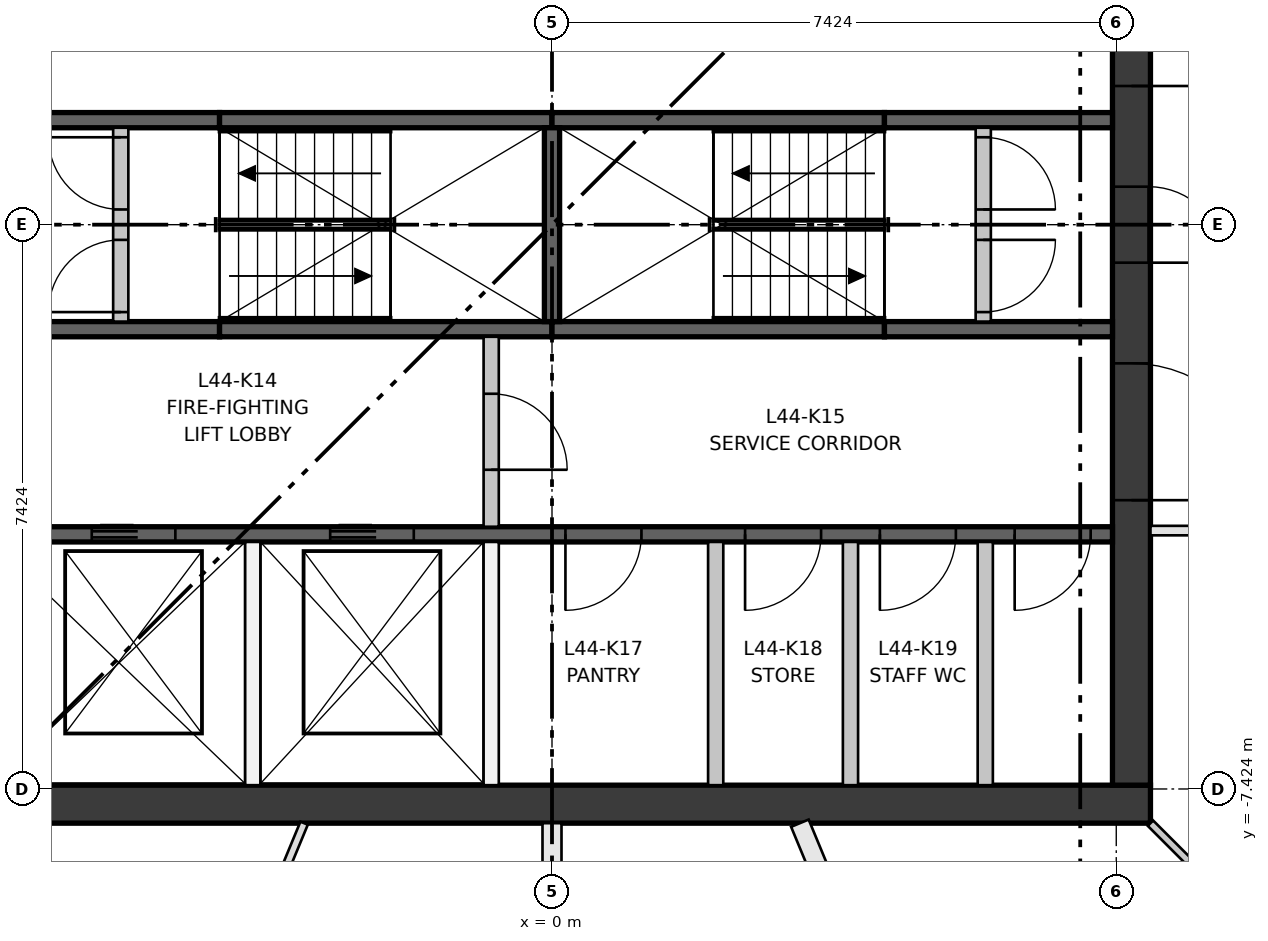
"""IFC4 building model, lengths in metres.
Left out: names, types, materials, properties, quantities, classifications, styles, units other than length and angle.
Written with IfcOpenShell. Run it as: python <this file> out.ifc"""

import sys

from ifc_helpers import new_model, si_unit, direction, frame, frame_2d, origin, place, context, subcontext, project, spatial, rectangle, extrude, element, fill, save


model = new_model("IFC4")
c1 = context("Model", 3, precision=1e-05, world=origin(), true_north=direction((0.0, 1.0)))
c2 = subcontext(c1, "Body", "Model", "MODEL_VIEW")
j1 = project(units=[si_unit("LENGTHUNIT", "METRE"), si_unit("PLANEANGLEUNIT", "RADIAN")], contexts=[c1])
p1 = place(None, origin())
s1 = spatial("IfcSite", under=j1, at=p1, CompositionType="ELEMENT")
p2 = place(p1, origin())
s2 = spatial("IfcBuilding", under=s1, at=p2, CompositionType="ELEMENT")
p3 = place(p2, frame((0.0, 0.0, 167.55)))
s3 = spatial("IfcBuildingStorey", under=s2, at=p3, CompositionType="ELEMENT", Elevation=167.55)
p4 = place(p3, frame((-7.874, -7.624, 0.0), z_axis=(0.0, 0.0, 1.0), x_axis=(1.0, 0.0, 0.0)))
e1 = element("IfcWall", 1, at=p4, inside=s3, PredefinedType="SHEAR", context=c2, shape_type="SweptSolid", body=[
    extrude(rectangle(XDim=15.748, YDim=0.5, at=frame_2d((7.874, 0.0))), origin(), (0.0, 0.0, 1.0), 3.35),
])
p5 = place(p3, frame((7.624, -7.374, 0.0), z_axis=(0.0, 0.0, 1.0), x_axis=(0.0, 1.0, 0.0)))
e2 = element("IfcWall", 2, at=p5, inside=s3, PredefinedType="SHEAR", context=c2, shape_type="SweptSolid", body=[
    extrude(rectangle(XDim=14.748, YDim=0.5, at=frame_2d((7.374, 0.0))), origin(), (0.0, 0.0, 1.0), 3.35),
])
p6 = place(p5, frame((6.874, 0.0, 0.0)))
e3 = element("IfcOpeningElement", 3, at=p6, cuts=e2, PredefinedType="OPENING", context=c2, shape_type="SweptSolid", body=[
    extrude(rectangle(XDim=1.0, YDim=2.1, at=frame_2d((0.5, 1.05))), frame((0.0, 0.26, 0.0), z_axis=(0.0, -1.0, 0.0), x_axis=(1.0, 0.0, 0.0)), (0.0, 0.0, 1.0), 0.52),
])
p7 = place(p5, frame((3.75, 0.0, 0.0)))
e4 = element("IfcOpeningElement", 4, at=p7, cuts=e2, PredefinedType="OPENING", context=c2, shape_type="SweptSolid", body=[
    extrude(rectangle(XDim=1.8, YDim=2.1, at=frame_2d((0.9, 1.05))), frame((0.0, 0.26, 0.0), z_axis=(0.0, -1.0, 0.0), x_axis=(1.0, 0.0, 0.0)), (0.0, 0.0, 1.0), 0.52),
])
p8 = place(p5, frame((9.198, 0.0, 0.0)))
e5 = element("IfcOpeningElement", 5, at=p8, cuts=e2, PredefinedType="OPENING", context=c2, shape_type="SweptSolid", body=[
    extrude(rectangle(XDim=1.8, YDim=2.1, at=frame_2d((0.9, 1.05))), frame((0.0, 0.26, 0.0), z_axis=(0.0, -1.0, 0.0), x_axis=(1.0, 0.0, 0.0)), (0.0, 0.0, 1.0), 0.52),
])
p9 = place(p3, frame((-7.374, -4.074, 0.0), z_axis=(0.0, 0.0, 1.0), x_axis=(1.0, 0.0, 0.0)))
e6 = element("IfcWall", 6, at=p9, inside=s3, PredefinedType="SHEAR", context=c2, shape_type="SweptSolid", body=[
    extrude(rectangle(XDim=14.748, YDim=0.2, at=frame_2d((7.374, 0.0))), origin(), (0.0, 0.0, 1.0), 3.0),
])
p10 = place(p9, frame((1.319, 0.0, 0.0)))
e7 = element("IfcOpeningElement", 7, at=p10, cuts=e6, PredefinedType="OPENING", context=c2, shape_type="SweptSolid", body=[
    extrude(rectangle(XDim=1.1, YDim=2.1, at=frame_2d((0.55, 1.05))), frame((0.0, 0.11, 0.0), z_axis=(0.0, -1.0, 0.0), x_axis=(1.0, 0.0, 0.0)), (0.0, 0.0, 1.0), 0.22),
])
p11 = place(p9, frame((4.456, 0.0, 0.0)))
e8 = element("IfcOpeningElement", 8, at=p11, cuts=e6, PredefinedType="OPENING", context=c2, shape_type="SweptSolid", body=[
    extrude(rectangle(XDim=1.1, YDim=2.1, at=frame_2d((0.55, 1.05))), frame((0.0, 0.11, 0.0), z_axis=(0.0, -1.0, 0.0), x_axis=(1.0, 0.0, 0.0)), (0.0, 0.0, 1.0), 0.22),
])
p12 = place(p9, frame((7.551, 0.0, 0.0)))
e9 = element("IfcOpeningElement", 9, at=p12, cuts=e6, PredefinedType="OPENING", context=c2, shape_type="SweptSolid", body=[
    extrude(rectangle(XDim=1.0, YDim=2.1, at=frame_2d((0.5, 1.05))), frame((0.0, 0.11, 0.0), z_axis=(0.0, -1.0, 0.0), x_axis=(1.0, 0.0, 0.0)), (0.0, 0.0, 1.0), 0.22),
])
p13 = place(p9, frame((9.914, 0.0, 0.0)))
e10 = element("IfcOpeningElement", 10, at=p13, cuts=e6, PredefinedType="OPENING", context=c2, shape_type="SweptSolid", body=[
    extrude(rectangle(XDim=1.0, YDim=2.1, at=frame_2d((0.5, 1.05))), frame((0.0, 0.11, 0.0), z_axis=(0.0, -1.0, 0.0), x_axis=(1.0, 0.0, 0.0)), (0.0, 0.0, 1.0), 0.22),
])
p14 = place(p9, frame((11.688, 0.0, 0.0)))
e11 = element("IfcOpeningElement", 11, at=p14, cuts=e6, PredefinedType="OPENING", context=c2, shape_type="SweptSolid", body=[
    extrude(rectangle(XDim=1.0, YDim=2.1, at=frame_2d((0.5, 1.05))), frame((0.0, 0.11, 0.0), z_axis=(0.0, -1.0, 0.0), x_axis=(1.0, 0.0, 0.0)), (0.0, 0.0, 1.0), 0.22),
])
p15 = place(p9, frame((13.461, 0.0, 0.0)))
e12 = element("IfcOpeningElement", 12, at=p15, cuts=e6, PredefinedType="OPENING", context=c2, shape_type="SweptSolid", body=[
    extrude(rectangle(XDim=1.0, YDim=2.1, at=frame_2d((0.5, 1.05))), frame((0.0, 0.11, 0.0), z_axis=(0.0, -1.0, 0.0), x_axis=(1.0, 0.0, 0.0)), (0.0, 0.0, 1.0), 0.22),
])
p16 = place(p3, frame((-7.374, -1.375, 0.0), z_axis=(0.0, 0.0, 1.0), x_axis=(1.0, 0.0, 0.0)))
e13 = element("IfcWall", 13, at=p16, inside=s3, PredefinedType="SHEAR", context=c2, shape_type="SweptSolid", body=[
    extrude(rectangle(XDim=3.0, YDim=0.2, at=frame_2d((1.5, 0.0))), origin(), (0.0, 0.0, 1.0), 3.0),
])
for number, where, z_axis, x_axis in (
    (14, (-4.374, -1.375, 0.0), (0.0, 0.0, 1.0), (1.0, 0.0, 0.0)),
    (15, (0.0, -1.375, 0.0), (0.0, 0.0, 1.0), (1.0, 0.0, 0.0)),
):
    element("IfcWall", number, at=place(p3, frame(where, z_axis=z_axis, x_axis=x_axis)), inside=s3, PredefinedType="SHEAR", context=c2, shape_type="SweptSolid", body=[
        extrude(rectangle(XDim=4.374, YDim=0.2, at=frame_2d((2.187, 0.0))), origin(), (0.0, 0.0, 1.0), 3.0),
    ])
for number, where, z_axis, x_axis in (
    (16, (4.374, -1.375, 0.0), (0.0, 0.0, 1.0), (1.0, 0.0, 0.0)),
    (17, (-7.374, 1.375, 0.0), (0.0, 0.0, 1.0), (1.0, 0.0, 0.0)),
):
    element("IfcWall", number, at=place(p3, frame(where, z_axis=z_axis, x_axis=x_axis)), inside=s3, PredefinedType="SHEAR", context=c2, shape_type="SweptSolid", body=[
        extrude(rectangle(XDim=3.0, YDim=0.2, at=frame_2d((1.5, 0.0))), origin(), (0.0, 0.0, 1.0), 3.0),
    ])
for number, where, z_axis, x_axis in (
    (18, (-4.374, 1.375, 0.0), (0.0, 0.0, 1.0), (1.0, 0.0, 0.0)),
    (19, (0.0, 1.375, 0.0), (0.0, 0.0, 1.0), (1.0, 0.0, 0.0)),
):
    element("IfcWall", number, at=place(p3, frame(where, z_axis=z_axis, x_axis=x_axis)), inside=s3, PredefinedType="SHEAR", context=c2, shape_type="SweptSolid", body=[
        extrude(rectangle(XDim=4.374, YDim=0.2, at=frame_2d((2.187, 0.0))), origin(), (0.0, 0.0, 1.0), 3.0),
    ])
p17 = place(p3, frame((4.374, 1.375, 0.0), z_axis=(0.0, 0.0, 1.0), x_axis=(1.0, 0.0, 0.0)))
e20 = element("IfcWall", 20, at=p17, inside=s3, PredefinedType="SHEAR", context=c2, shape_type="SweptSolid", body=[
    extrude(rectangle(XDim=3.0, YDim=0.2, at=frame_2d((1.5, 0.0))), origin(), (0.0, 0.0, 1.0), 3.0),
])
p18 = place(p3, frame((0.0, -1.275, 0.0), z_axis=(0.0, 0.0, 1.0), x_axis=(0.0, 1.0, 0.0)))
e21 = element("IfcWall", 21, at=p18, inside=s3, PredefinedType="SHEAR", context=c2, shape_type="SweptSolid", body=[
    extrude(rectangle(XDim=2.55, YDim=0.2, at=frame_2d((1.275, 0.0))), origin(), (0.0, 0.0, 1.0), 3.0),
])
for number, where, z_axis, x_axis in (
    (22, (-3.937, -7.374, 0.0), (0.0, 0.0, 1.0), (0.0, 1.0, 0.0)),
    (23, (-0.8, -7.374, 0.0), (0.0, 0.0, 1.0), (0.0, 1.0, 0.0)),
):
    element("IfcWall", number, at=place(p3, frame(where, z_axis=z_axis, x_axis=x_axis)), inside=s3, PredefinedType="PARTITIONING", context=c2, shape_type="SweptSolid", body=[
        extrude(rectangle(XDim=3.2, YDim=0.2, at=frame_2d((1.6, 0.0))), origin(), (0.0, 0.0, 1.0), 3.0),
    ])
p19 = place(p3, frame((-0.8, -3.974, 0.0), z_axis=(0.0, 0.0, 1.0), x_axis=(0.0, 1.0, 0.0)))
e24 = element("IfcWall", 24, at=p19, inside=s3, PredefinedType="PARTITIONING", context=c2, shape_type="SweptSolid", body=[
    extrude(rectangle(XDim=2.499, YDim=0.2, at=frame_2d((1.25, 0.0))), origin(), (0.0, 0.0, 1.0), 3.0),
])
p20 = place(p19, frame((0.75, 0.0, 0.0)))
e25 = element("IfcOpeningElement", 25, at=p20, cuts=e24, PredefinedType="OPENING", context=c2, shape_type="SweptSolid", body=[
    extrude(rectangle(XDim=1.0, YDim=2.1, at=frame_2d((0.5, 1.05))), frame((0.0, 0.11, 0.0), z_axis=(0.0, -1.0, 0.0), x_axis=(1.0, 0.0, 0.0)), (0.0, 0.0, 1.0), 0.22),
])
for number, where, z_axis, x_axis in (
    (26, (2.154, -7.374, 0.0), (0.0, 0.0, 1.0), (0.0, 1.0, 0.0)),
    (27, (3.927, -7.374, 0.0), (0.0, 0.0, 1.0), (0.0, 1.0, 0.0)),
    (28, (5.7, -7.374, 0.0), (0.0, 0.0, 1.0), (0.0, 1.0, 0.0)),
):
    element("IfcWall", number, at=place(p3, frame(where, z_axis=z_axis, x_axis=x_axis)), inside=s3, PredefinedType="PARTITIONING", context=c2, shape_type="SweptSolid", body=[
        extrude(rectangle(XDim=3.2, YDim=0.2, at=frame_2d((1.6, 0.0))), origin(), (0.0, 0.0, 1.0), 3.0),
    ])
p21 = place(p3, frame((-5.674, -1.275, 0.0), z_axis=(0.0, 0.0, 1.0), x_axis=(0.0, 1.0, 0.0)))
e29 = element("IfcWall", 29, at=p21, inside=s3, PredefinedType="PARTITIONING", context=c2, shape_type="SweptSolid", body=[
    extrude(rectangle(XDim=2.55, YDim=0.2, at=frame_2d((1.275, 0.0))), origin(), (0.0, 0.0, 1.0), 3.0),
])
p22 = place(p21, frame((0.125, 0.0, 0.0)))
e30 = element("IfcOpeningElement", 30, at=p22, cuts=e29, PredefinedType="OPENING", context=c2, shape_type="SweptSolid", body=[
    extrude(rectangle(XDim=0.95, YDim=2.1, at=frame_2d((0.475, 1.05))), frame((0.0, 0.11, 0.0), z_axis=(0.0, -1.0, 0.0), x_axis=(1.0, 0.0, 0.0)), (0.0, 0.0, 1.0), 0.22),
])
p23 = place(p21, frame((1.475, 0.0, 0.0)))
e31 = element("IfcOpeningElement", 31, at=p23, cuts=e29, PredefinedType="OPENING", context=c2, shape_type="SweptSolid", body=[
    extrude(rectangle(XDim=0.95, YDim=2.1, at=frame_2d((0.475, 1.05))), frame((0.0, 0.11, 0.0), z_axis=(0.0, -1.0, 0.0), x_axis=(1.0, 0.0, 0.0)), (0.0, 0.0, 1.0), 0.22),
])
p24 = place(p3, frame((5.674, -1.275, 0.0), z_axis=(0.0, 0.0, 1.0), x_axis=(0.0, 1.0, 0.0)))
e32 = element("IfcWall", 32, at=p24, inside=s3, PredefinedType="PARTITIONING", context=c2, shape_type="SweptSolid", body=[
    extrude(rectangle(XDim=2.55, YDim=0.2, at=frame_2d((1.275, 0.0))), origin(), (0.0, 0.0, 1.0), 3.0),
])
p25 = place(p24, frame((0.125, 0.0, 0.0)))
e33 = element("IfcOpeningElement", 33, at=p25, cuts=e32, PredefinedType="OPENING", context=c2, shape_type="SweptSolid", body=[
    extrude(rectangle(XDim=0.95, YDim=2.1, at=frame_2d((0.475, 1.05))), frame((0.0, 0.11, 0.0), z_axis=(0.0, -1.0, 0.0), x_axis=(1.0, 0.0, 0.0)), (0.0, 0.0, 1.0), 0.22),
])
p26 = place(p24, frame((1.475, 0.0, 0.0)))
e34 = element("IfcOpeningElement", 34, at=p26, cuts=e32, PredefinedType="OPENING", context=c2, shape_type="SweptSolid", body=[
    extrude(rectangle(XDim=0.95, YDim=2.1, at=frame_2d((0.475, 1.05))), frame((0.0, 0.11, 0.0), z_axis=(0.0, -1.0, 0.0), x_axis=(1.0, 0.0, 0.0)), (0.0, 0.0, 1.0), 0.22),
])
p27 = place(p3, frame((12.615, -4.024, 0.0), z_axis=(0.0, 0.0, 1.0), x_axis=(-1.0, 0.0, 0.0)))
e35 = element("IfcWall", 35, at=p27, inside=s3, PredefinedType="PARTITIONING", context=c2, shape_type="SweptSolid", body=[
    extrude(rectangle(XDim=4.741, YDim=0.125, at=frame_2d((2.37, 0.0))), origin(), (0.0, 0.0, 1.0), 3.0),
])
p28 = place(p27, frame((1.9, 0.0, 0.0)))
e36 = element("IfcOpeningElement", 36, at=p28, cuts=e35, PredefinedType="OPENING", context=c2, shape_type="SweptSolid", body=[
    extrude(rectangle(XDim=1.0, YDim=2.1, at=frame_2d((0.5, 1.05))), frame((0.0, 0.073, 0.0), z_axis=(0.0, -1.0, 0.0), x_axis=(1.0, 0.0, 0.0)), (0.0, 0.0, 1.0), 0.145),
])
p29 = place(p3, frame((-3.261, -7.874, 0.0), z_axis=(0.0, 0.0, 1.0), x_axis=(-0.382707643949, -0.923869503373, 0.0)))
e37 = element("IfcWall", 37, at=p29, inside=s3, PredefinedType="PARTITIONING", context=c2, shape_type="SweptSolid", body=[
    extrude(rectangle(XDim=4.827, YDim=0.105, at=frame_2d((2.414, 0.0))), origin(), (0.0, 0.0, 1.0), 3.0),
])
p30 = place(p29, frame((1.9, 0.0, 0.0)))
e38 = element("IfcOpeningElement", 38, at=p30, cuts=e37, PredefinedType="OPENING", context=c2, shape_type="SweptSolid", body=[
    extrude(rectangle(XDim=1.0, YDim=2.1, at=frame_2d((0.5, 1.05))), frame((0.0, 0.062, 0.0), z_axis=(0.0, -1.0, 0.0), x_axis=(1.0, 0.0, 0.0)), (0.0, 0.0, 1.0), 0.125),
])
p31 = place(p3, frame((0.0, -7.874, 0.0), z_axis=(0.0, 0.0, 1.0), x_axis=(0.0, -1.0, 0.0)))
e39 = element("IfcWall", 39, at=p31, inside=s3, PredefinedType="PARTITIONING", context=c2, shape_type="SweptSolid", body=[
    extrude(rectangle(XDim=5.476, YDim=0.25, at=frame_2d((2.738, 0.0))), origin(), (0.0, 0.0, 1.0), 3.0),
])
p32 = place(p3, frame((3.261, -7.874, 0.0), z_axis=(0.0, 0.0, 1.0), x_axis=(0.382707643949, -0.923869503373, 0.0)))
e40 = element("IfcWall", 40, at=p32, inside=s3, PredefinedType="PARTITIONING", context=c2, shape_type="SweptSolid", body=[
    extrude(rectangle(XDim=4.827, YDim=0.25, at=frame_2d((2.414, 0.0))), origin(), (0.0, 0.0, 1.0), 3.0),
])
p33 = place(p3, frame((12.459, -12.459, 0.0), z_axis=(0.0, 0.0, 1.0), x_axis=(-0.707106781187, 0.707106781187, 0.0)))
e41 = element("IfcWall", 41, at=p33, inside=s3, PredefinedType="PARTITIONING", context=c2, shape_type="SweptSolid", body=[
    extrude(rectangle(XDim=6.484, YDim=0.1, at=frame_2d((3.242, 0.0))), origin(), (0.0, 0.0, 1.0), 3.0),
])
p34 = place(p33, frame((3.0, 0.0, 0.0)))
e42 = element("IfcOpeningElement", 42, at=p34, cuts=e41, PredefinedType="OPENING", context=c2, shape_type="SweptSolid", body=[
    extrude(rectangle(XDim=1.0, YDim=2.1, at=frame_2d((0.5, 1.05))), frame((0.0, 0.06, 0.0), z_axis=(0.0, -1.0, 0.0), x_axis=(1.0, 0.0, 0.0)), (0.0, 0.0, 1.0), 0.12),
])
p35 = place(p10, origin())
e43 = element("IfcDoor", 43, at=p35, inside=s3, OperationType="DOUBLE_DOOR_SLIDING", PredefinedType="DOOR", context=c2, shape_type="SweptSolid", body=[
    extrude(rectangle(XDim=1.1, YDim=2.1, at=frame_2d((0.55, 1.05))), frame((0.0, 0.025, 0.0), z_axis=(0.0, -1.0, 0.0), x_axis=(1.0, 0.0, 0.0)), (0.0, 0.0, 1.0), 0.05),
])
fill(e7, e43)
p36 = place(p11, origin())
e44 = element("IfcDoor", 44, at=p36, inside=s3, OperationType="DOUBLE_DOOR_SLIDING", PredefinedType="DOOR", context=c2, shape_type="SweptSolid", body=[
    extrude(rectangle(XDim=1.1, YDim=2.1, at=frame_2d((0.55, 1.05))), frame((0.0, 0.025, 0.0), z_axis=(0.0, -1.0, 0.0), x_axis=(1.0, 0.0, 0.0)), (0.0, 0.0, 1.0), 0.05),
])
fill(e8, e44)
p37 = place(p22, origin())
e45 = element("IfcDoor", 45, at=p37, inside=s3, OperationType="SINGLE_SWING_LEFT", PredefinedType="DOOR", context=c2, shape_type="SweptSolid", body=[
    extrude(rectangle(XDim=0.95, YDim=2.1, at=frame_2d((0.475, 1.05))), frame((0.0, 0.025, 0.0), z_axis=(0.0, -1.0, 0.0), x_axis=(1.0, 0.0, 0.0)), (0.0, 0.0, 1.0), 0.05),
])
fill(e30, e45)
p38 = place(p23, origin())
e46 = element("IfcDoor", 46, at=p38, inside=s3, OperationType="SINGLE_SWING_RIGHT", PredefinedType="DOOR", context=c2, shape_type="SweptSolid", body=[
    extrude(rectangle(XDim=0.95, YDim=2.1, at=frame_2d((0.475, 1.05))), frame((0.0, 0.025, 0.0), z_axis=(0.0, -1.0, 0.0), x_axis=(1.0, 0.0, 0.0)), (0.0, 0.0, 1.0), 0.05),
])
fill(e31, e46)
p39 = place(p25, frame((0.95, 0.0, 0.0), z_axis=(0.0, 0.0, 1.0), x_axis=(-1.0, 0.0, 0.0)))
e47 = element("IfcDoor", 47, at=p39, inside=s3, OperationType="SINGLE_SWING_RIGHT", PredefinedType="DOOR", context=c2, shape_type="SweptSolid", body=[
    extrude(rectangle(XDim=0.95, YDim=2.1, at=frame_2d((0.475, 1.05))), frame((0.0, 0.025, 0.0), z_axis=(0.0, -1.0, 0.0), x_axis=(1.0, 0.0, 0.0)), (0.0, 0.0, 1.0), 0.05),
])
fill(e33, e47)
p40 = place(p26, frame((0.95, 0.0, 0.0), z_axis=(0.0, 0.0, 1.0), x_axis=(-1.0, 0.0, 0.0)))
e48 = element("IfcDoor", 48, at=p40, inside=s3, OperationType="SINGLE_SWING_LEFT", PredefinedType="DOOR", context=c2, shape_type="SweptSolid", body=[
    extrude(rectangle(XDim=0.95, YDim=2.1, at=frame_2d((0.475, 1.05))), frame((0.0, 0.025, 0.0), z_axis=(0.0, -1.0, 0.0), x_axis=(1.0, 0.0, 0.0)), (0.0, 0.0, 1.0), 0.05),
])
fill(e34, e48)
p41 = place(p20, frame((1.0, 0.0, 0.0), z_axis=(0.0, 0.0, 1.0), x_axis=(-1.0, 0.0, 0.0)))
e49 = element("IfcDoor", 49, at=p41, inside=s3, OperationType="SINGLE_SWING_LEFT", PredefinedType="DOOR", context=c2, shape_type="SweptSolid", body=[
    extrude(rectangle(XDim=1.0, YDim=2.1, at=frame_2d((0.5, 1.05))), frame((0.0, 0.025, 0.0), z_axis=(0.0, -1.0, 0.0), x_axis=(1.0, 0.0, 0.0)), (0.0, 0.0, 1.0), 0.05),
])
fill(e25, e49)
p42 = place(p12, frame((1.0, 0.0, 0.0), z_axis=(0.0, 0.0, 1.0), x_axis=(-1.0, 0.0, 0.0)))
e50 = element("IfcDoor", 50, at=p42, inside=s3, OperationType="SINGLE_SWING_LEFT", PredefinedType="DOOR", context=c2, shape_type="SweptSolid", body=[
    extrude(rectangle(XDim=1.0, YDim=2.1, at=frame_2d((0.5, 1.05))), frame((0.0, 0.025, 0.0), z_axis=(0.0, -1.0, 0.0), x_axis=(1.0, 0.0, 0.0)), (0.0, 0.0, 1.0), 0.05),
])
fill(e9, e50)
p43 = place(p13, frame((1.0, 0.0, 0.0), z_axis=(0.0, 0.0, 1.0), x_axis=(-1.0, 0.0, 0.0)))
e51 = element("IfcDoor", 51, at=p43, inside=s3, OperationType="SINGLE_SWING_LEFT", PredefinedType="DOOR", context=c2, shape_type="SweptSolid", body=[
    extrude(rectangle(XDim=1.0, YDim=2.1, at=frame_2d((0.5, 1.05))), frame((0.0, 0.025, 0.0), z_axis=(0.0, -1.0, 0.0), x_axis=(1.0, 0.0, 0.0)), (0.0, 0.0, 1.0), 0.05),
])
fill(e10, e51)
p44 = place(p14, frame((1.0, 0.0, 0.0), z_axis=(0.0, 0.0, 1.0), x_axis=(-1.0, 0.0, 0.0)))
e52 = element("IfcDoor", 52, at=p44, inside=s3, OperationType="SINGLE_SWING_LEFT", PredefinedType="DOOR", context=c2, shape_type="SweptSolid", body=[
    extrude(rectangle(XDim=1.0, YDim=2.1, at=frame_2d((0.5, 1.05))), frame((0.0, 0.025, 0.0), z_axis=(0.0, -1.0, 0.0), x_axis=(1.0, 0.0, 0.0)), (0.0, 0.0, 1.0), 0.05),
])
fill(e11, e52)
p45 = place(p15, frame((1.0, 0.0, 0.0), z_axis=(0.0, 0.0, 1.0), x_axis=(-1.0, 0.0, 0.0)))
e53 = element("IfcDoor", 53, at=p45, inside=s3, OperationType="SINGLE_SWING_LEFT", PredefinedType="DOOR", context=c2, shape_type="SweptSolid", body=[
    extrude(rectangle(XDim=1.0, YDim=2.1, at=frame_2d((0.5, 1.05))), frame((0.0, 0.025, 0.0), z_axis=(0.0, -1.0, 0.0), x_axis=(1.0, 0.0, 0.0)), (0.0, 0.0, 1.0), 0.05),
])
fill(e12, e53)
p46 = place(p6, frame((1.0, 0.0, 0.0), z_axis=(0.0, 0.0, 1.0), x_axis=(-1.0, 0.0, 0.0)))
e54 = element("IfcDoor", 54, at=p46, inside=s3, OperationType="SINGLE_SWING_LEFT", PredefinedType="DOOR", context=c2, shape_type="SweptSolid", body=[
    extrude(rectangle(XDim=1.0, YDim=2.1, at=frame_2d((0.5, 1.05))), frame((0.0, 0.25, 0.0), z_axis=(0.0, -1.0, 0.0), x_axis=(1.0, 0.0, 0.0)), (0.0, 0.0, 1.0), 0.05),
])
fill(e3, e54)
p47 = place(p7, frame((1.8, 0.0, 0.0), z_axis=(0.0, 0.0, 1.0), x_axis=(-1.0, 0.0, 0.0)))
e55 = element("IfcDoor", 55, at=p47, inside=s3, OperationType="DOUBLE_DOOR_SINGLE_SWING", PredefinedType="DOOR", context=c2, shape_type="SweptSolid", body=[
    extrude(rectangle(XDim=1.8, YDim=2.1, at=frame_2d((0.9, 1.05))), frame((0.0, 0.025, 0.0), z_axis=(0.0, -1.0, 0.0), x_axis=(1.0, 0.0, 0.0)), (0.0, 0.0, 1.0), 0.05),
])
fill(e4, e55)
p48 = place(p8, frame((1.8, 0.0, 0.0), z_axis=(0.0, 0.0, 1.0), x_axis=(-1.0, 0.0, 0.0)))
e56 = element("IfcDoor", 56, at=p48, inside=s3, OperationType="DOUBLE_DOOR_SINGLE_SWING", PredefinedType="DOOR", context=c2, shape_type="SweptSolid", body=[
    extrude(rectangle(XDim=1.8, YDim=2.1, at=frame_2d((0.9, 1.05))), frame((0.0, 0.025, 0.0), z_axis=(0.0, -1.0, 0.0), x_axis=(1.0, 0.0, 0.0)), (0.0, 0.0, 1.0), 0.05),
])
fill(e5, e56)
save(model, sys.argv[1])
